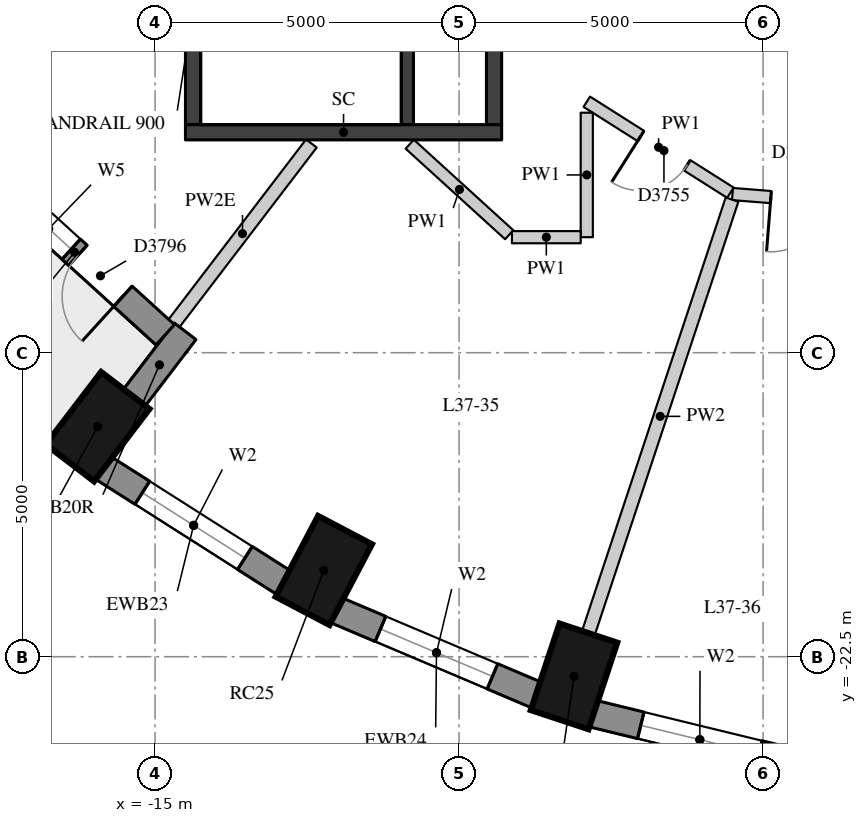
"""IFC4 building model, lengths in metres.
Left out: names, types, materials, properties, quantities, classifications, styles, units other than length and angle.
Written with IfcOpenShell. Run it as: python <this file> out.ifc"""

import sys

from ifc_helpers import new_model, si_unit, direction, frame, frame_2d, origin, origin_2d, place, context, subcontext, project, spatial, rectangle, extrude, element, fill, save


model = new_model("IFC4")
c1 = context("Model", 3, precision=1e-05, world=origin(), true_north=direction((0.0, 1.0)))
c2 = subcontext(c1, "Body", "Model", "MODEL_VIEW")
j1 = project(units=[si_unit("LENGTHUNIT", "METRE"), si_unit("PLANEANGLEUNIT", "RADIAN")], contexts=[c1])
p1 = place(None, origin())
s1 = spatial("IfcSite", under=j1, at=p1, CompositionType="ELEMENT")
p2 = place(p1, origin())
s2 = spatial("IfcBuilding", under=s1, at=p2, CompositionType="ELEMENT")
p3 = place(p2, frame((0.0, 0.0, 131.8)))
s3 = spatial("IfcBuildingStorey", under=s2, at=p3, CompositionType="ELEMENT", Elevation=131.8)
for number, where, z_axis, x_axis in (
    (1, (-15.945, -18.717, 0.0), (0.0, 0.0, 1.0), (-0.607, -0.795, 0.0)),
    (2, (-12.225, -21.082, 0.0), (0.0, 0.0, 1.0), (-0.465, -0.885, 0.0)),
    (3, (-8.11, -22.824, 0.0), (0.0, 0.0, 1.0), (-0.315, -0.949, 0.0)),
):
    element("IfcColumn", number, at=place(p3, frame(where, z_axis=z_axis, x_axis=x_axis)), inside=s3, PredefinedType="COLUMN", context=c2, shape_type="SweptSolid", body=[
        extrude(rectangle(XDim=1.5, YDim=1.0, at=origin_2d()), origin(), (0.0, 0.0, 1.0), 3.3),
    ])
p4 = place(p3, frame((-15.856, -19.392, 0.0), z_axis=(0.0, 0.0, 1.0), x_axis=(0.843891947083, -0.53651317006, 0.0)))
e4 = element("IfcWall", 4, at=p4, inside=s3, PredefinedType="SOLIDWALL", context=c2, shape_type="SweptSolid", body=[
    extrude(rectangle(XDim=3.532, YDim=0.45, at=frame_2d((1.766, 0.0))), origin(), (0.0, 0.0, 1.0), 2.85),
])
p5 = place(p4, frame((0.766, 0.0, 0.4)))
e5 = element("IfcOpeningElement", 5, at=p5, cuts=e4, PredefinedType="OPENING", context=c2, shape_type="SweptSolid", body=[
    extrude(rectangle(XDim=2.0, YDim=1.75, at=frame_2d((1.0, 0.875))), frame((0.0, 0.235, 0.0), z_axis=(0.0, -1.0, 0.0), x_axis=(1.0, 0.0, 0.0)), (0.0, 0.0, 1.0), 0.47),
])
p6 = place(p3, frame((-12.025, -21.733, 0.0), z_axis=(0.0, 0.0, 1.0), x_axis=(0.920879975612, -0.389846213932, 0.0)))
e6 = element("IfcWall", 6, at=p6, inside=s3, PredefinedType="SOLIDWALL", context=c2, shape_type="SweptSolid", body=[
    extrude(rectangle(XDim=3.592, YDim=0.45, at=frame_2d((1.796, 0.0))), origin(), (0.0, 0.0, 1.0), 2.85),
])
p7 = place(p6, frame((0.796, 0.0, 0.4)))
e7 = element("IfcOpeningElement", 7, at=p7, cuts=e6, PredefinedType="OPENING", context=c2, shape_type="SweptSolid", body=[
    extrude(rectangle(XDim=2.0, YDim=1.75, at=frame_2d((1.0, 0.875))), frame((0.0, 0.235, 0.0), z_axis=(0.0, -1.0, 0.0), x_axis=(1.0, 0.0, 0.0)), (0.0, 0.0, 1.0), 0.47),
])
p8 = place(p3, frame((-7.807, -23.435, 0.0), z_axis=(0.0, 0.0, 1.0), x_axis=(0.971667603162, -0.236351579148, 0.0)))
e8 = element("IfcWall", 8, at=p8, inside=s3, PredefinedType="SOLIDWALL", context=c2, shape_type="SweptSolid", body=[
    extrude(rectangle(XDim=3.635, YDim=0.45, at=frame_2d((1.817, 0.0))), origin(), (0.0, 0.0, 1.0), 2.85),
])
p9 = place(p8, frame((0.817, 0.0, 0.4)))
e9 = element("IfcOpeningElement", 9, at=p9, cuts=e8, PredefinedType="OPENING", context=c2, shape_type="SweptSolid", body=[
    extrude(rectangle(XDim=2.0, YDim=1.75, at=frame_2d((1.0, 0.875))), frame((0.0, 0.235, 0.0), z_axis=(0.0, -1.0, 0.0), x_axis=(1.0, 0.0, 0.0)), (0.0, 0.0, 1.0), 0.47),
])
p10 = place(p3, frame((-15.35, -18.253, 0.0), z_axis=(0.0, 0.0, 1.0), x_axis=(0.607026495834, 0.794681592435, 0.0)))
e10 = element("IfcWall", 10, at=p10, inside=s3, PredefinedType="SOLIDWALL", context=c2, shape_type="SweptSolid", body=[
    extrude(rectangle(XDim=1.391, YDim=0.45, at=frame_2d((0.695, 0.0))), origin(), (0.0, 0.0, 1.0), 2.4),
])
p11 = place(p3, frame((-17.814, -14.491, 0.0), z_axis=(0.0, 0.0, 1.0), x_axis=(0.73951517403, -0.673139886933, 0.0)))
e11 = element("IfcWall", 11, at=p11, inside=s3, PredefinedType="SOLIDWALL", context=c2, shape_type="SweptSolid", body=[
    extrude(rectangle(XDim=4.031, YDim=0.45, at=frame_2d((2.016, 0.0))), origin(), (0.0, 0.0, 1.0), 2.85),
])
p12 = place(p11, frame((0.941, 0.0, 0.4)))
e12 = element("IfcOpeningElement", 12, at=p12, cuts=e11, PredefinedType="OPENING", context=c2, shape_type="SweptSolid", body=[
    extrude(rectangle(XDim=1.0, YDim=1.75, at=frame_2d((0.5, 0.875))), frame((0.0, 0.235, 0.0), z_axis=(0.0, -1.0, 0.0), x_axis=(1.0, 0.0, 0.0)), (0.0, 0.0, 1.0), 0.47),
])
p13 = place(p11, frame((2.091, 0.0, 0.0)))
e13 = element("IfcOpeningElement", 13, at=p13, cuts=e11, PredefinedType="OPENING", context=c2, shape_type="SweptSolid", body=[
    extrude(rectangle(XDim=1.0, YDim=2.15, at=frame_2d((0.5, 1.075))), frame((0.0, 0.235, 0.0), z_axis=(0.0, -1.0, 0.0), x_axis=(1.0, 0.0, 0.0)), (0.0, 0.0, 1.0), 0.47),
])
p14 = place(p3, frame((-10.85, -13.75, 0.0), z_axis=(0.0, 0.0, 1.0), x_axis=(0.0, 1.0, 0.0)))
e14 = element("IfcWall", 14, at=p14, inside=s3, PredefinedType="SHEAR", context=c2, shape_type="SweptSolid", body=[
    extrude(rectangle(XDim=6.0, YDim=0.2, at=frame_2d((3.0, 0.0))), origin(), (0.0, 0.0, 1.0), 2.85),
])
p15 = place(p14, frame((4.4, 0.0, 0.0)))
e15 = element("IfcOpeningElement", 15, at=p15, cuts=e14, PredefinedType="OPENING", context=c2, shape_type="SweptSolid", body=[
    extrude(rectangle(XDim=1.5, YDim=2.1, at=frame_2d((0.75, 1.05))), frame((0.0, 0.11, 0.0), z_axis=(0.0, -1.0, 0.0), x_axis=(1.0, 0.0, 0.0)), (0.0, 0.0, 1.0), 0.22),
])
p16 = place(p3, frame((-14.375, -13.75, -0.28), z_axis=(0.0, 0.0, 1.0), x_axis=(0.0, 1.0, 0.0)))
e16 = element("IfcWall", 16, at=p16, inside=s3, PredefinedType="SHEAR", context=c2, shape_type="SweptSolid", body=[
    extrude(rectangle(XDim=6.0, YDim=0.25, at=frame_2d((3.0, 0.0))), origin(), (0.0, 0.0, 1.0), 3.13),
])
p17 = place(p3, frame((-9.425, -13.75, -0.28), z_axis=(0.0, 0.0, 1.0), x_axis=(0.0, 1.0, 0.0)))
e17 = element("IfcWall", 17, at=p17, inside=s3, PredefinedType="SHEAR", context=c2, shape_type="SweptSolid", body=[
    extrude(rectangle(XDim=6.0, YDim=0.25, at=frame_2d((3.0, 0.0))), origin(), (0.0, 0.0, 1.0), 3.13),
])
p18 = place(p17, frame((2.4, 0.0, 0.28)))
e18 = element("IfcOpeningElement", 18, at=p18, cuts=e17, PredefinedType="OPENING", context=c2, shape_type="SweptSolid", body=[
    extrude(rectangle(XDim=1.5, YDim=2.1, at=frame_2d((0.75, 1.05))), frame((0.0, 0.135, 0.0), z_axis=(0.0, -1.0, 0.0), x_axis=(1.0, 0.0, 0.0)), (0.0, 0.0, 1.0), 0.27),
])
p19 = place(p3, frame((-14.5, -13.875, -0.28), z_axis=(0.0, 0.0, 1.0), x_axis=(1.0, 0.0, 0.0)))
e19 = element("IfcWall", 19, at=p19, inside=s3, PredefinedType="SHEAR", context=c2, shape_type="SweptSolid", body=[
    extrude(rectangle(XDim=5.2, YDim=0.25, at=frame_2d((2.6, 0.0))), origin(), (0.0, 0.0, 1.0), 3.13),
])
p20 = place(p3, frame((3.971, -15.641, 0.0), z_axis=(0.0, 0.0, 1.0), x_axis=(-0.996873811728, 0.079010148026, 0.0)))
e20 = element("IfcWall", 20, at=p20, inside=s3, PredefinedType="PARTITIONING", context=c2, shape_type="SweptSolid", body=[
    extrude(rectangle(XDim=9.505, YDim=0.2, at=frame_2d((4.752, 0.0))), origin(), (0.0, 0.0, 1.0), 2.25),
])
p21 = place(p20, frame((7.971, 0.0, 0.0)))
e21 = element("IfcOpeningElement", 21, at=p21, cuts=e20, PredefinedType="OPENING", context=c2, shape_type="SweptSolid", body=[
    extrude(rectangle(XDim=0.9, YDim=2.1, at=frame_2d((0.45, 1.05))), frame((0.0, 0.11, 0.0), z_axis=(0.0, -1.0, 0.0), x_axis=(1.0, 0.0, 0.0)), (0.0, 0.0, 1.0), 0.22),
])
p22 = place(p20, frame((3.391, 0.0, 0.0)))
e22 = element("IfcOpeningElement", 22, at=p22, cuts=e20, PredefinedType="OPENING", context=c2, shape_type="SweptSolid", body=[
    extrude(rectangle(XDim=1.0, YDim=2.1, at=frame_2d((0.5, 1.05))), frame((0.0, 0.11, 0.0), z_axis=(0.0, -1.0, 0.0), x_axis=(1.0, 0.0, 0.0)), (0.0, 0.0, 1.0), 0.22),
])
p23 = place(p20, frame((1.866, 0.0, 0.0)))
e23 = element("IfcOpeningElement", 23, at=p23, cuts=e20, PredefinedType="OPENING", context=c2, shape_type="SweptSolid", body=[
    extrude(rectangle(XDim=0.9, YDim=2.1, at=frame_2d((0.45, 1.05))), frame((0.0, 0.11, 0.0), z_axis=(0.0, -1.0, 0.0), x_axis=(1.0, 0.0, 0.0)), (0.0, 0.0, 1.0), 0.22),
])
p24 = place(p3, frame((-5.537, -14.869, 0.0), z_axis=(0.0, 0.0, 1.0), x_axis=(-0.844770404655, 0.535128922242, 0.0)))
e24 = element("IfcWall", 24, at=p24, inside=s3, PredefinedType="PARTITIONING", context=c2, shape_type="SweptSolid", body=[
    extrude(rectangle(XDim=2.797, YDim=0.2, at=frame_2d((1.398, 0.0))), origin(), (0.0, 0.0, 1.0), 2.85),
])
p25 = place(p24, frame((0.844, 0.0, 0.0)))
e25 = element("IfcOpeningElement", 25, at=p25, cuts=e24, PredefinedType="OPENING", context=c2, shape_type="SweptSolid", body=[
    extrude(rectangle(XDim=0.9, YDim=2.1, at=frame_2d((0.45, 1.05))), frame((0.0, 0.11, 0.0), z_axis=(0.0, -1.0, 0.0), x_axis=(1.0, 0.0, 0.0)), (0.0, 0.0, 1.0), 0.22),
])
p26 = place(p3, frame((-7.9, -13.552, 0.0), z_axis=(0.0, 0.0, 1.0), x_axis=(0.0, -1.0, 0.0)))
e26 = element("IfcWall", 26, at=p26, inside=s3, PredefinedType="PARTITIONING", context=c2, shape_type="SweptSolid", body=[
    extrude(rectangle(XDim=2.048, YDim=0.2, at=frame_2d((1.024, 0.0))), origin(), (0.0, 0.0, 1.0), 2.85),
])
p27 = place(p3, frame((-8.0, -15.6, 0.0), z_axis=(0.0, 0.0, 1.0), x_axis=(-1.0, 0.0, 0.0)))
e27 = element("IfcWall", 27, at=p27, inside=s3, PredefinedType="PARTITIONING", context=c2, shape_type="SweptSolid", body=[
    extrude(rectangle(XDim=1.131, YDim=0.2, at=frame_2d((0.565, 0.0))), origin(), (0.0, 0.0, 1.0), 2.85),
])
p28 = place(p3, frame((-9.176, -15.56, 0.0), z_axis=(0.0, 0.0, 1.0), x_axis=(-0.73943556447, 0.673227336044, 0.0)))
e28 = element("IfcWall", 28, at=p28, inside=s3, PredefinedType="PARTITIONING", context=c2, shape_type="SweptSolid", body=[
    extrude(rectangle(XDim=2.212, YDim=0.2, at=frame_2d((1.106, 0.0))), origin(), (0.0, 0.0, 1.0), 2.85),
])
p29 = place(p3, frame((-14.696, -17.025, 0.0), z_axis=(0.0, 0.0, 1.0), x_axis=(0.607059278405, 0.794656550028, 0.0)))
e29 = element("IfcWall", 29, at=p29, inside=s3, PredefinedType="PARTITIONING", context=c2, shape_type="SweptSolid", body=[
    extrude(rectangle(XDim=3.734, YDim=0.22, at=frame_2d((1.867, 0.0))), origin(), (0.0, 0.0, 1.0), 2.4),
])
p30 = place(p3, frame((-7.874, -22.112, 0.0), z_axis=(0.0, 0.0, 1.0), x_axis=(0.314559895628, 0.949237626763, 0.0)))
e30 = element("IfcWall", 30, at=p30, inside=s3, PredefinedType="PARTITIONING", context=c2, shape_type="SweptSolid", body=[
    extrude(rectangle(XDim=7.511, YDim=0.22, at=frame_2d((3.756, 0.0))), origin(), (0.0, 0.0, 1.0), 2.85),
])
p31 = place(p5, origin())
e31 = element("IfcWindow", 31, at=p31, inside=s3, PartitioningType="SINGLE_PANEL", PredefinedType="WINDOW", context=c2, shape_type="SweptSolid", body=[
    extrude(rectangle(XDim=2.0, YDim=1.75, at=frame_2d((1.0, 0.875))), frame((0.0, 0.035, 0.0), z_axis=(0.0, -1.0, 0.0), x_axis=(1.0, 0.0, 0.0)), (0.0, 0.0, 1.0), 0.06),
])
fill(e5, e31)
p32 = place(p7, origin())
e32 = element("IfcWindow", 32, at=p32, inside=s3, PartitioningType="SINGLE_PANEL", PredefinedType="WINDOW", context=c2, shape_type="SweptSolid", body=[
    extrude(rectangle(XDim=2.0, YDim=1.75, at=frame_2d((1.0, 0.875))), frame((0.0, 0.035, 0.0), z_axis=(0.0, -1.0, 0.0), x_axis=(1.0, 0.0, 0.0)), (0.0, 0.0, 1.0), 0.06),
])
fill(e7, e32)
p33 = place(p9, origin())
e33 = element("IfcWindow", 33, at=p33, inside=s3, PartitioningType="SINGLE_PANEL", PredefinedType="WINDOW", context=c2, shape_type="SweptSolid", body=[
    extrude(rectangle(XDim=2.0, YDim=1.75, at=frame_2d((1.0, 0.875))), frame((0.0, 0.035, 0.0), z_axis=(0.0, -1.0, 0.0), x_axis=(1.0, 0.0, 0.0)), (0.0, 0.0, 1.0), 0.06),
])
fill(e9, e33)
p34 = place(p12, origin())
e34 = element("IfcWindow", 34, at=p34, inside=s3, PartitioningType="SINGLE_PANEL", PredefinedType="WINDOW", context=c2, shape_type="SweptSolid", body=[
    extrude(rectangle(XDim=1.0, YDim=1.75, at=frame_2d((0.5, 0.875))), frame((0.0, 0.035, 0.0), z_axis=(0.0, -1.0, 0.0), x_axis=(1.0, 0.0, 0.0)), (0.0, 0.0, 1.0), 0.06),
])
fill(e12, e34)
p35 = place(p13, frame((1.0, 0.0, 0.0), z_axis=(0.0, 0.0, 1.0), x_axis=(-1.0, 0.0, 0.0)))
e35 = element("IfcDoor", 35, at=p35, inside=s3, OperationType="SINGLE_SWING_LEFT", PredefinedType="DOOR", context=c2, shape_type="SweptSolid", body=[
    extrude(rectangle(XDim=1.0, YDim=2.15, at=frame_2d((0.5, 1.075))), frame((0.0, 0.075, 0.0), z_axis=(0.0, -1.0, 0.0), x_axis=(1.0, 0.0, 0.0)), (0.0, 0.0, 1.0), 0.05),
])
fill(e13, e35)
p36 = place(p25, origin())
e36 = element("IfcDoor", 36, at=p36, inside=s3, OperationType="SINGLE_SWING_RIGHT", PredefinedType="DOOR", context=c2, shape_type="SweptSolid", body=[
    extrude(rectangle(XDim=0.9, YDim=2.1, at=frame_2d((0.45, 1.05))), frame((0.0, 0.025, 0.0), z_axis=(0.0, -1.0, 0.0), x_axis=(1.0, 0.0, 0.0)), (0.0, 0.0, 1.0), 0.05),
])
fill(e25, e36)
p37 = place(p21, origin())
e37 = element("IfcDoor", 37, at=p37, inside=s3, OperationType="SINGLE_SWING_RIGHT", PredefinedType="DOOR", context=c2, shape_type="SweptSolid", body=[
    extrude(rectangle(XDim=0.9, YDim=2.1, at=frame_2d((0.45, 1.05))), frame((0.0, 0.025, 0.0), z_axis=(0.0, -1.0, 0.0), x_axis=(1.0, 0.0, 0.0)), (0.0, 0.0, 1.0), 0.05),
])
fill(e21, e37)
save(model, sys.argv[1])
